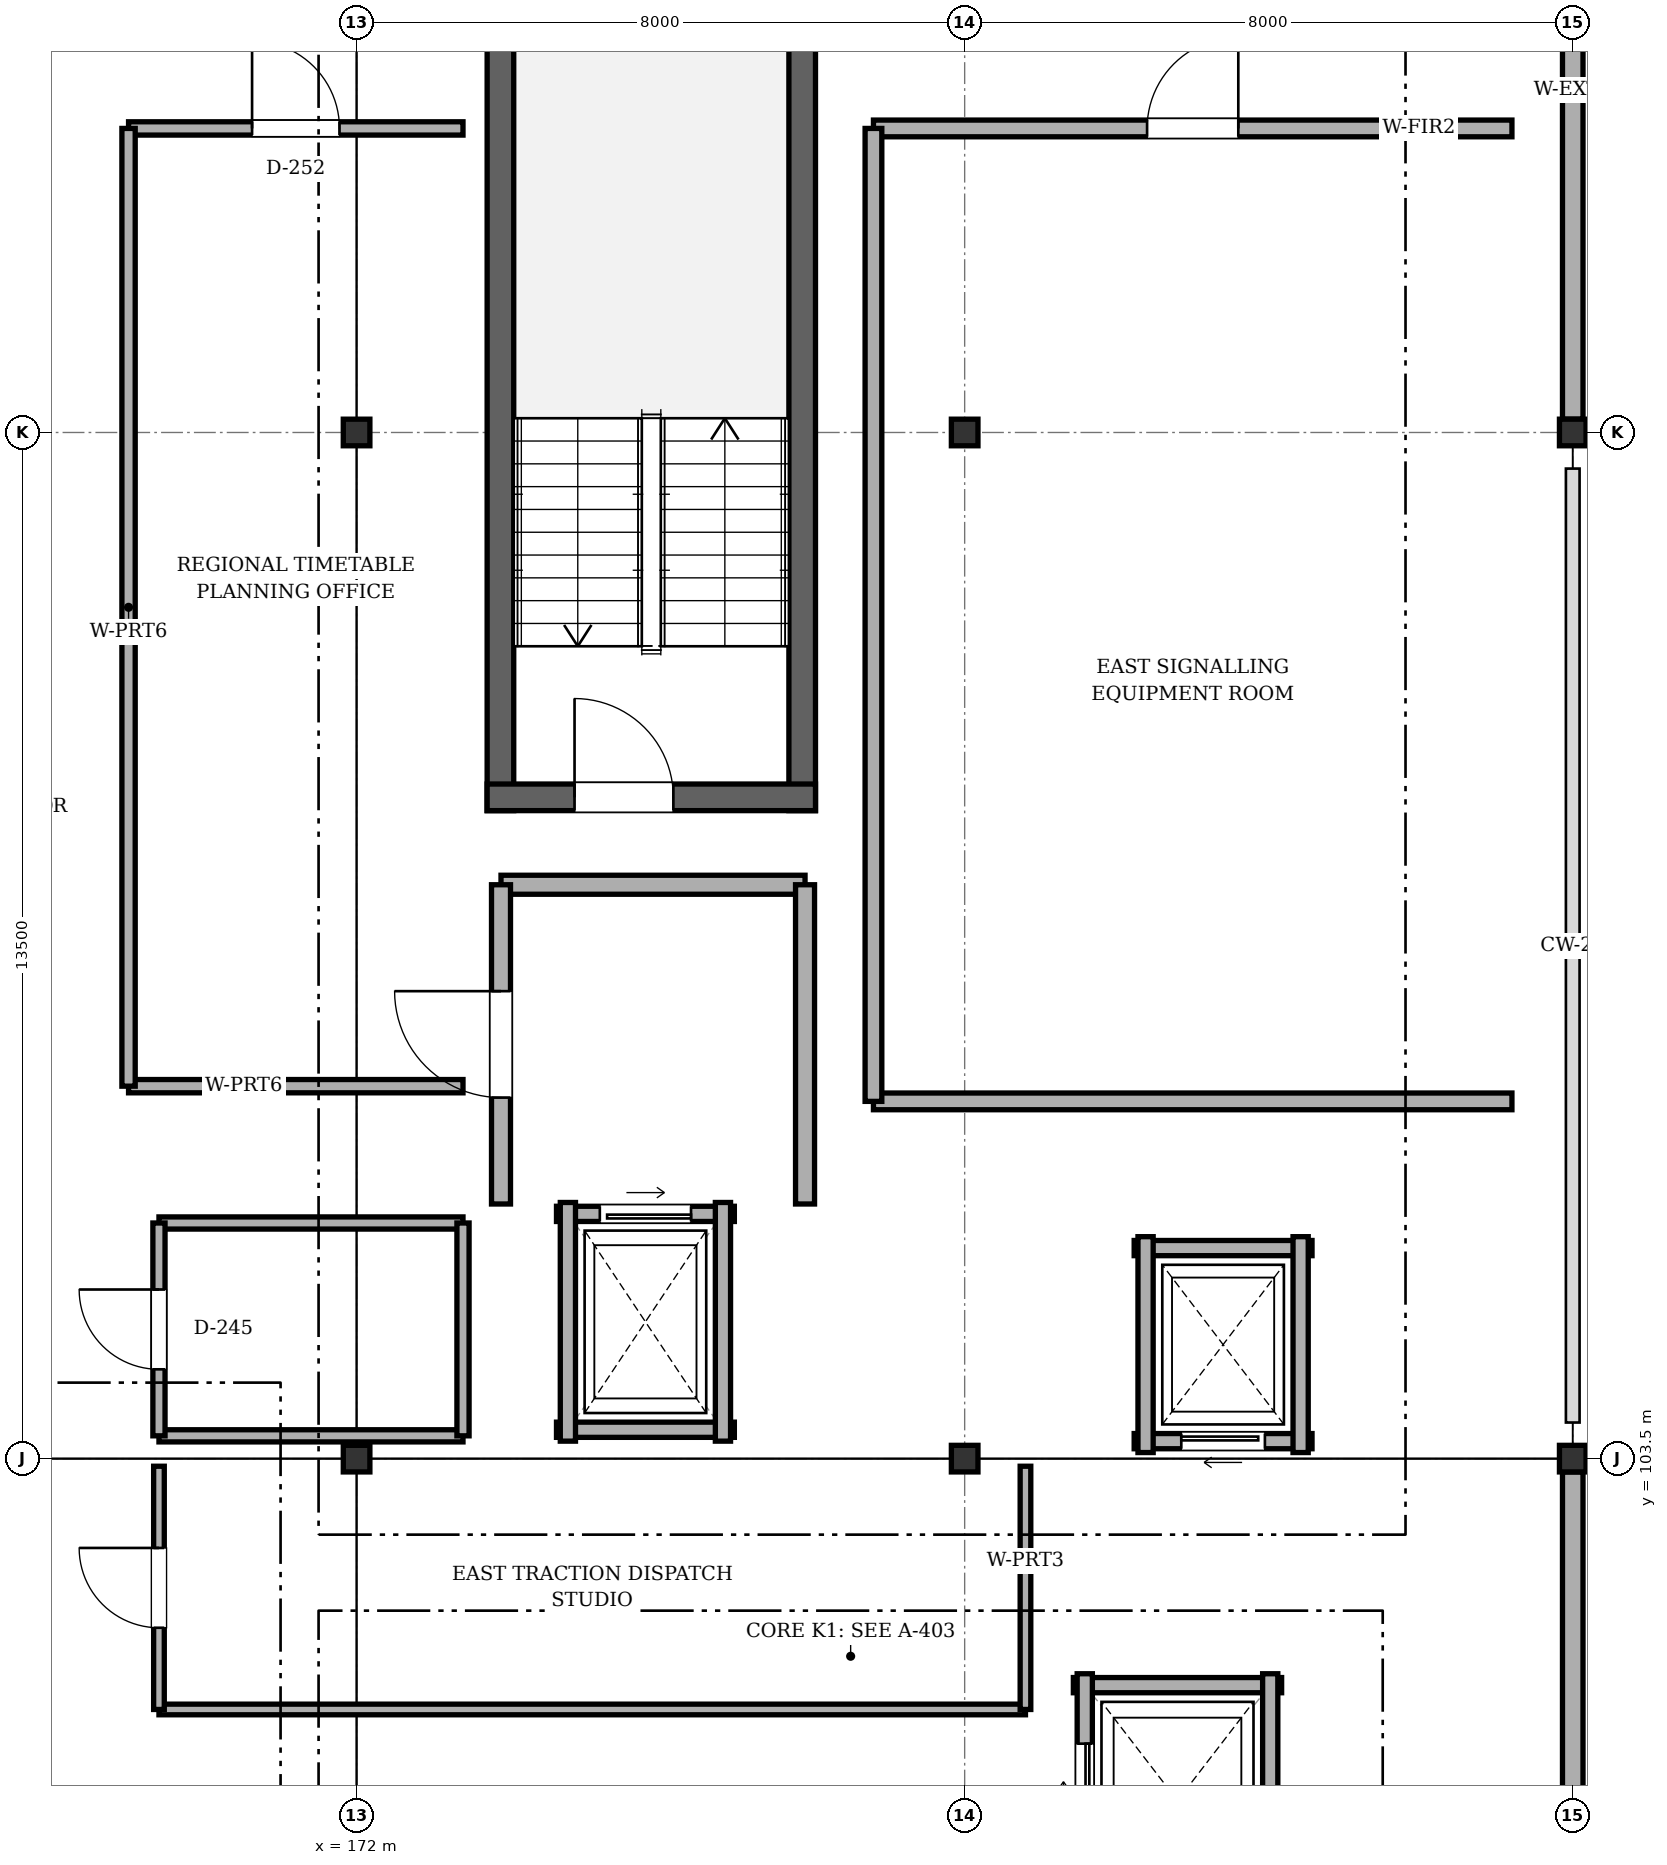
"""IFC4 building model, lengths in metres.
Left out: names, types, materials, properties, quantities, classifications, styles, units other than length and angle.
Written with IfcOpenShell. Run it as: python <this file> out.ifc"""

import sys

from ifc_helpers import new_model, si_unit, direction, frame, frame_2d, origin, origin_2d, place, context, subcontext, project, spatial, rectangle, i_section, extrude, element, fill, save


model = new_model("IFC4")
c1 = context("Model", 3, precision=1e-05, world=origin(), true_north=direction((0.0, 1.0)))
c2 = subcontext(c1, "Body", "Model", "MODEL_VIEW")
j1 = project(units=[si_unit("LENGTHUNIT", "METRE"), si_unit("PLANEANGLEUNIT", "RADIAN")], contexts=[c1])
p1 = place(None, origin())
s1 = spatial("IfcSite", under=j1, at=p1, CompositionType="ELEMENT")
p2 = place(p1, origin())
s2 = spatial("IfcBuilding", under=s1, at=p2, CompositionType="ELEMENT")
p3 = place(p2, frame((0.0, 0.0, 17.6)))
s3 = spatial("IfcBuildingStorey", under=s2, at=p3, CompositionType="ELEMENT", Elevation=17.6)
for number, where, z_axis, x_axis in (
    (1, (172.0, 103.5, 0.0), (0.0, 0.0, 1.0), (1.0, 0.0, 0.0)),
    (2, (172.0, 117.0, 0.0), (0.0, 0.0, 1.0), (1.0, 0.0, 0.0)),
    (3, (180.0, 103.5, 0.0), (0.0, 0.0, 1.0), (1.0, 0.0, 0.0)),
    (4, (180.0, 117.0, 0.0), (0.0, 0.0, 1.0), (1.0, 0.0, 0.0)),
    (5, (188.0, 103.5, 0.0), (0.0, 0.0, 1.0), (1.0, 0.0, 0.0)),
    (6, (188.0, 117.0, 0.0), (0.0, 0.0, 1.0), (1.0, 0.0, 0.0)),
):
    element("IfcColumn", number, at=place(p3, frame(where, z_axis=z_axis, x_axis=x_axis)), inside=s3, PredefinedType="COLUMN", context=c2, shape_type="SweptSolid", body=[
        extrude(i_section(OverallWidth=0.35, OverallDepth=0.35, WebThickness=0.012, FlangeThickness=0.019, FilletRadius=0.02, at=origin_2d()), origin(), (0.0, 0.0, 1.0), 3.2),
    ])
for number, where, z_axis, x_axis in (
    (7, (188.0, 103.325, 0.0), (0.0, 0.0, 1.0), (0.0, -1.0, 0.0)),
    (8, (188.0, 125.825, 0.0), (0.0, 0.0, 1.0), (0.0, -1.0, 0.0)),
):
    element("IfcWall", number, at=place(p3, frame(where, z_axis=z_axis, x_axis=x_axis)), inside=s3, PredefinedType="SOLIDWALL", context=c2, shape_type="SweptSolid", body=[
        extrude(rectangle(XDim=8.65, YDim=0.27, at=frame_2d((4.325, 0.0))), origin(), (0.0, 0.0, 1.0), 2.375),
    ])
for number, where, z_axis, x_axis in (
    (9, (177.863, 112.025, 0.0), (0.0, 0.0, 1.0), (0.0, 1.0, 0.0)),
    (10, (173.893, 122.522, 0.0), (0.0, 0.0, 1.0), (0.0, -1.0, 0.0)),
):
    element("IfcWall", number, at=place(p3, frame(where, z_axis=z_axis, x_axis=x_axis)), inside=s3, PredefinedType="SHEAR", context=c2, shape_type="SweptSolid", body=[
        extrude(rectangle(XDim=10.498, YDim=0.35, at=frame_2d((5.249, 0.0))), origin(), (0.0, 0.0, 1.0), 2.98),
    ])
p4 = place(p3, frame((173.718, 112.2, 0.0), z_axis=(0.0, 0.0, 1.0), x_axis=(1.0, 0.0, 0.0)))
e11 = element("IfcWall", 11, at=p4, inside=s3, PredefinedType="SHEAR", context=c2, shape_type="SweptSolid", body=[
    extrude(rectangle(XDim=4.32, YDim=0.35, at=frame_2d((2.16, 0.0))), origin(), (0.0, 0.0, 1.0), 2.98),
])
p5 = place(p4, frame((1.15, 0.0, 0.0)))
e12 = element("IfcOpeningElement", 12, at=p5, cuts=e11, PredefinedType="OPENING", context=c2, shape_type="SweptSolid", body=[
    extrude(rectangle(XDim=1.3, YDim=2.1, at=frame_2d((0.65, 1.05))), frame((0.0, 0.185, 0.0), z_axis=(0.0, -1.0, 0.0), x_axis=(1.0, 0.0, 0.0)), (0.0, 0.0, 1.0), 0.37),
])
p6 = place(p3, frame((174.63, 103.88, 0.0), z_axis=(0.0, 0.0, 1.0), x_axis=(1.0, 0.0, 0.0)))
e13 = element("IfcWall", 13, at=p6, inside=s3, PredefinedType="SOLIDWALL", context=c2, shape_type="SweptSolid", body=[
    extrude(rectangle(XDim=2.34, YDim=0.2, at=frame_2d((1.17, 0.0))), origin(), (0.0, 0.0, 1.0), 2.515),
])
p7 = place(p3, frame((176.97, 106.72, 0.0), z_axis=(0.0, 0.0, 1.0), x_axis=(-1.0, 0.0, 0.0)))
e14 = element("IfcWall", 14, at=p7, inside=s3, PredefinedType="SOLIDWALL", context=c2, shape_type="SweptSolid", body=[
    extrude(rectangle(XDim=2.34, YDim=0.2, at=frame_2d((1.17, 0.0))), origin(), (0.0, 0.0, 1.0), 2.955),
])
p8 = place(p7, frame((0.57, 0.0, 0.0)))
e15 = element("IfcOpeningElement", 15, at=p8, cuts=e14, PredefinedType="OPENING", context=c2, shape_type="SweptSolid", body=[
    extrude(rectangle(XDim=1.2, YDim=2.15, at=frame_2d((0.6, 1.075))), frame((0.0, 0.11, 0.0), z_axis=(0.0, -1.0, 0.0), x_axis=(1.0, 0.0, 0.0)), (0.0, 0.0, 1.0), 0.22),
])
for number, where, z_axis, x_axis in (
    (16, (174.78, 106.87, 0.0), (0.0, 0.0, 1.0), (0.0, -1.0, 0.0)),
    (17, (176.82, 103.73, 0.0), (0.0, 0.0, 1.0), (0.0, 1.0, 0.0)),
):
    element("IfcWall", number, at=place(p3, frame(where, z_axis=z_axis, x_axis=x_axis)), inside=s3, PredefinedType="SOLIDWALL", context=c2, shape_type="SweptSolid", body=[
        extrude(rectangle(XDim=3.14, YDim=0.2, at=frame_2d((1.57, 0.0))), origin(), (0.0, 0.0, 1.0), 2.515),
    ])
p9 = place(p3, frame((182.23, 103.73, 0.0), z_axis=(0.0, 0.0, 1.0), x_axis=(1.0, 0.0, 0.0)))
e18 = element("IfcWall", 18, at=p9, inside=s3, PredefinedType="SOLIDWALL", context=c2, shape_type="SweptSolid", body=[
    extrude(rectangle(XDim=2.34, YDim=0.2, at=frame_2d((1.17, 0.0))), origin(), (0.0, 0.0, 1.0), 2.515),
])
p10 = place(p9, frame((0.62, 0.0, 0.0)))
e19 = element("IfcOpeningElement", 19, at=p10, cuts=e18, PredefinedType="OPENING", context=c2, shape_type="SweptSolid", body=[
    extrude(rectangle(XDim=1.1, YDim=2.15, at=frame_2d((0.55, 1.075))), frame((0.0, 0.11, 0.0), z_axis=(0.0, -1.0, 0.0), x_axis=(1.0, 0.0, 0.0)), (0.0, 0.0, 1.0), 0.22),
])
p11 = place(p3, frame((184.57, 106.27, 0.0), z_axis=(0.0, 0.0, 1.0), x_axis=(-1.0, 0.0, 0.0)))
e20 = element("IfcWall", 20, at=p11, inside=s3, PredefinedType="SOLIDWALL", context=c2, shape_type="SweptSolid", body=[
    extrude(rectangle(XDim=2.34, YDim=0.2, at=frame_2d((1.17, 0.0))), origin(), (0.0, 0.0, 1.0), 2.955),
])
for number, where, z_axis, x_axis in (
    (21, (182.38, 106.42, 0.0), (0.0, 0.0, 1.0), (0.0, -1.0, 0.0)),
    (22, (184.42, 103.58, 0.0), (0.0, 0.0, 1.0), (0.0, 1.0, 0.0)),
):
    element("IfcWall", number, at=place(p3, frame(where, z_axis=z_axis, x_axis=x_axis)), inside=s3, PredefinedType="SOLIDWALL", context=c2, shape_type="SweptSolid", body=[
        extrude(rectangle(XDim=2.84, YDim=0.2, at=frame_2d((1.42, 0.0))), origin(), (0.0, 0.0, 1.0), 2.515),
    ])
p12 = place(p3, frame((184.17, 100.52, 0.0), z_axis=(0.0, 0.0, 1.0), x_axis=(-1.0, 0.0, 0.0)))
e23 = element("IfcWall", 23, at=p12, inside=s3, PredefinedType="SOLIDWALL", context=c2, shape_type="SweptSolid", body=[
    extrude(rectangle(XDim=2.74, YDim=0.2, at=frame_2d((1.37, 0.0))), origin(), (0.0, 0.0, 1.0), 2.955),
])
p13 = place(p3, frame((181.58, 100.67, 0.0), z_axis=(0.0, 0.0, 1.0), x_axis=(0.0, -1.0, 0.0)))
e24 = element("IfcWall", 24, at=p13, inside=s3, PredefinedType="SOLIDWALL", context=c2, shape_type="SweptSolid", body=[
    extrude(rectangle(XDim=3.34, YDim=0.2, at=frame_2d((1.67, 0.0))), origin(), (0.0, 0.0, 1.0), 2.955),
])
p14 = place(p13, frame((0.92, 0.0, 0.0)))
e25 = element("IfcOpeningElement", 25, at=p14, cuts=e24, PredefinedType="OPENING", context=c2, shape_type="SweptSolid", body=[
    extrude(rectangle(XDim=1.5, YDim=2.2, at=frame_2d((0.75, 1.1))), frame((0.0, 0.11, 0.0), z_axis=(0.0, -1.0, 0.0), x_axis=(1.0, 0.0, 0.0)), (0.0, 0.0, 1.0), 0.22),
])
p15 = place(p3, frame((184.02, 97.33, 0.0), z_axis=(0.0, 0.0, 1.0), x_axis=(0.0, 1.0, 0.0)))
e26 = element("IfcWall", 26, at=p15, inside=s3, PredefinedType="SOLIDWALL", context=c2, shape_type="SweptSolid", body=[
    extrude(rectangle(XDim=3.34, YDim=0.2, at=frame_2d((1.67, 0.0))), origin(), (0.0, 0.0, 1.0), 2.955),
])
p16 = place(p3, frame((180.8, 100.2, 0.0), z_axis=(0.0, 0.0, 1.0), x_axis=(-1.0, 0.0, 0.0)))
e27 = element("IfcWall", 27, at=p16, inside=s3, PredefinedType="PARTITIONING", context=c2, shape_type="SweptSolid", body=[
    extrude(rectangle(XDim=11.4, YDim=0.14, at=frame_2d((5.7, 0.0))), origin(), (0.0, 0.0, 1.0), 2.565),
])
p17 = place(p3, frame((169.4, 100.2, 0.0), z_axis=(0.0, 0.0, 1.0), x_axis=(0.0, 1.0, 0.0)))
e28 = element("IfcWall", 28, at=p17, inside=s3, PredefinedType="PARTITIONING", context=c2, shape_type="SweptSolid", body=[
    extrude(rectangle(XDim=3.2, YDim=0.14, at=frame_2d((1.6, 0.0))), origin(), (0.0, 0.0, 1.0), 2.515),
])
p18 = place(p17, frame((1.075, 0.0, 0.0)))
e29 = element("IfcOpeningElement", 29, at=p18, cuts=e28, PredefinedType="OPENING", context=c2, shape_type="SweptSolid", body=[
    extrude(rectangle(XDim=1.05, YDim=2.1, at=frame_2d((0.525, 1.05))), frame((0.0, 0.08, 0.0), z_axis=(0.0, -1.0, 0.0), x_axis=(1.0, 0.0, 0.0)), (0.0, 0.0, 1.0), 0.16),
])
p19 = place(p3, frame((180.8, 103.4, 0.0), z_axis=(0.0, 0.0, 1.0), x_axis=(0.0, -1.0, 0.0)))
e30 = element("IfcWall", 30, at=p19, inside=s3, PredefinedType="PARTITIONING", context=c2, shape_type="SweptSolid", body=[
    extrude(rectangle(XDim=3.2, YDim=0.14, at=frame_2d((1.6, 0.0))), origin(), (0.0, 0.0, 1.0), 2.355),
])
for number, where, z_axis, x_axis in (
    (31, (173.4, 103.8, 0.0), (0.0, 0.0, 1.0), (-1.0, 0.0, 0.0)),
    (32, (169.4, 106.6, 0.0), (0.0, 0.0, 1.0), (1.0, 0.0, 0.0)),
):
    element("IfcWall", number, at=place(p3, frame(where, z_axis=z_axis, x_axis=x_axis)), inside=s3, PredefinedType="PARTITIONING", context=c2, shape_type="SweptSolid", body=[
        extrude(rectangle(XDim=4.0, YDim=0.16, at=frame_2d((2.0, 0.0))), origin(), (0.0, 0.0, 1.0), 2.355),
    ])
p20 = place(p3, frame((169.4, 103.8, 0.0), z_axis=(0.0, 0.0, 1.0), x_axis=(0.0, 1.0, 0.0)))
e33 = element("IfcWall", 33, at=p20, inside=s3, PredefinedType="PARTITIONING", context=c2, shape_type="SweptSolid", body=[
    extrude(rectangle(XDim=2.8, YDim=0.16, at=frame_2d((1.4, 0.0))), origin(), (0.0, 0.0, 1.0), 2.515),
])
p21 = place(p20, frame((0.875, 0.0, 0.0)))
e34 = element("IfcOpeningElement", 34, at=p21, cuts=e33, PredefinedType="OPENING", context=c2, shape_type="SweptSolid", body=[
    extrude(rectangle(XDim=1.05, YDim=2.1, at=frame_2d((0.525, 1.05))), frame((0.0, 0.09, 0.0), z_axis=(0.0, -1.0, 0.0), x_axis=(1.0, 0.0, 0.0)), (0.0, 0.0, 1.0), 0.18),
])
p22 = place(p3, frame((173.4, 106.6, 0.0), z_axis=(0.0, 0.0, 1.0), x_axis=(0.0, -1.0, 0.0)))
e35 = element("IfcWall", 35, at=p22, inside=s3, PredefinedType="PARTITIONING", context=c2, shape_type="SweptSolid", body=[
    extrude(rectangle(XDim=2.8, YDim=0.16, at=frame_2d((1.4, 0.0))), origin(), (0.0, 0.0, 1.0), 2.515),
])
p23 = place(p3, frame((187.2, 108.2, 0.0), z_axis=(0.0, 0.0, 1.0), x_axis=(-1.0, 0.0, 0.0)))
e36 = element("IfcWall", 36, at=p23, inside=s3, PredefinedType="SOLIDWALL", context=c2, shape_type="SweptSolid", body=[
    extrude(rectangle(XDim=8.4, YDim=0.22, at=frame_2d((4.2, 0.0))), origin(), (0.0, 0.0, 1.0), 2.355),
])
p24 = place(p3, frame((178.8, 121.0, 0.0), z_axis=(0.0, 0.0, 1.0), x_axis=(1.0, 0.0, 0.0)))
e37 = element("IfcWall", 37, at=p24, inside=s3, PredefinedType="SOLIDWALL", context=c2, shape_type="SweptSolid", body=[
    extrude(rectangle(XDim=8.4, YDim=0.22, at=frame_2d((4.2, 0.0))), origin(), (0.0, 0.0, 1.0), 2.495),
])
p25 = place(p24, frame((3.6, 0.0, 0.0)))
e38 = element("IfcOpeningElement", 38, at=p25, cuts=e37, PredefinedType="OPENING", context=c2, shape_type="SweptSolid", body=[
    extrude(rectangle(XDim=1.2, YDim=2.1, at=frame_2d((0.6, 1.05))), frame((0.0, 0.12, 0.0), z_axis=(0.0, -1.0, 0.0), x_axis=(1.0, 0.0, 0.0)), (0.0, 0.0, 1.0), 0.24),
])
p26 = place(p3, frame((178.8, 108.2, 0.0), z_axis=(0.0, 0.0, 1.0), x_axis=(0.0, 1.0, 0.0)))
e39 = element("IfcWall", 39, at=p26, inside=s3, PredefinedType="SOLIDWALL", context=c2, shape_type="SweptSolid", body=[
    extrude(rectangle(XDim=12.8, YDim=0.22, at=frame_2d((6.4, 0.0))), origin(), (0.0, 0.0, 1.0), 2.955),
])
p27 = place(p3, frame((173.4, 108.4, 0.0), z_axis=(0.0, 0.0, 1.0), x_axis=(-1.0, 0.0, 0.0)))
e40 = element("IfcWall", 40, at=p27, inside=s3, PredefinedType="PARTITIONING", context=c2, shape_type="SweptSolid", body=[
    extrude(rectangle(XDim=4.4, YDim=0.175, at=frame_2d((2.2, 0.0))), origin(), (0.0, 0.0, 1.0), 2.355),
])
p28 = place(p3, frame((169.0, 121.0, 0.0), z_axis=(0.0, 0.0, 1.0), x_axis=(1.0, 0.0, 0.0)))
e41 = element("IfcWall", 41, at=p28, inside=s3, PredefinedType="PARTITIONING", context=c2, shape_type="SweptSolid", body=[
    extrude(rectangle(XDim=4.4, YDim=0.175, at=frame_2d((2.2, 0.0))), origin(), (0.0, 0.0, 1.0), 2.565),
])
p29 = place(p28, frame((1.625, 0.0, 0.0)))
e42 = element("IfcOpeningElement", 42, at=p29, cuts=e41, PredefinedType="OPENING", context=c2, shape_type="SweptSolid", body=[
    extrude(rectangle(XDim=1.15, YDim=2.1, at=frame_2d((0.575, 1.05))), frame((0.0, 0.097, 0.0), z_axis=(0.0, -1.0, 0.0), x_axis=(1.0, 0.0, 0.0)), (0.0, 0.0, 1.0), 0.195),
])
p30 = place(p3, frame((169.0, 108.4, 0.0), z_axis=(0.0, 0.0, 1.0), x_axis=(0.0, 1.0, 0.0)))
e43 = element("IfcWall", 43, at=p30, inside=s3, PredefinedType="PARTITIONING", context=c2, shape_type="SweptSolid", body=[
    extrude(rectangle(XDim=12.6, YDim=0.175, at=frame_2d((6.3, 0.0))), origin(), (0.0, 0.0, 1.0), 2.515),
])
p31 = place(p3, frame((173.9, 111.05, 0.0), z_axis=(0.0, 0.0, 1.0), x_axis=(1.0, 0.0, 0.0)))
e44 = element("IfcWall", 44, at=p31, inside=s3, PredefinedType="SOLIDWALL", context=c2, shape_type="SweptSolid", body=[
    extrude(rectangle(XDim=4.0, YDim=0.25, at=frame_2d((2.0, 0.0))), origin(), (0.0, 0.0, 1.0), 2.955),
])
p32 = place(p3, frame((173.9, 106.85, 0.0), z_axis=(0.0, 0.0, 1.0), x_axis=(0.0, 1.0, 0.0)))
e45 = element("IfcWall", 45, at=p32, inside=s3, PredefinedType="SOLIDWALL", context=c2, shape_type="SweptSolid", body=[
    extrude(rectangle(XDim=4.2, YDim=0.25, at=frame_2d((2.1, 0.0))), origin(), (0.0, 0.0, 1.0), 2.955),
])
p33 = place(p32, frame((1.4, 0.0, 0.0)))
e46 = element("IfcOpeningElement", 46, at=p33, cuts=e45, PredefinedType="OPENING", context=c2, shape_type="SweptSolid", body=[
    extrude(rectangle(XDim=1.4, YDim=2.1, at=frame_2d((0.7, 1.05))), frame((0.0, 0.135, 0.0), z_axis=(0.0, -1.0, 0.0), x_axis=(1.0, 0.0, 0.0)), (0.0, 0.0, 1.0), 0.27),
])
p34 = place(p3, frame((177.9, 111.05, 0.0), z_axis=(0.0, 0.0, 1.0), x_axis=(0.0, -1.0, 0.0)))
e47 = element("IfcWall", 47, at=p34, inside=s3, PredefinedType="SOLIDWALL", context=c2, shape_type="SweptSolid", body=[
    extrude(rectangle(XDim=4.2, YDim=0.25, at=frame_2d((2.1, 0.0))), origin(), (0.0, 0.0, 1.0), 2.955),
])
p35 = place(p5, origin())
e48 = element("IfcDoor", 48, at=p35, inside=s3, OperationType="SINGLE_SWING_LEFT", PredefinedType="DOOR", context=c2, shape_type="SweptSolid", body=[
    extrude(rectangle(XDim=1.3, YDim=2.1, at=frame_2d((0.65, 1.05))), frame((0.0, 0.025, 0.0), z_axis=(0.0, -1.0, 0.0), x_axis=(1.0, 0.0, 0.0)), (0.0, 0.0, 1.0), 0.05),
])
fill(e12, e48)
p36 = place(p8, origin())
e49 = element("IfcDoor", 49, at=p36, inside=s3, OperationType="SLIDING_TO_LEFT", PredefinedType="DOOR", context=c2, shape_type="SweptSolid", body=[
    extrude(rectangle(XDim=1.2, YDim=2.15, at=frame_2d((0.6, 1.075))), frame((0.0, 0.025, 0.0), z_axis=(0.0, -1.0, 0.0), x_axis=(1.0, 0.0, 0.0)), (0.0, 0.0, 1.0), 0.05),
])
fill(e15, e49)
p37 = place(p10, origin())
e50 = element("IfcDoor", 50, at=p37, inside=s3, OperationType="SLIDING_TO_LEFT", PredefinedType="DOOR", context=c2, shape_type="SweptSolid", body=[
    extrude(rectangle(XDim=1.1, YDim=2.15, at=frame_2d((0.55, 1.075))), frame((0.0, 0.025, 0.0), z_axis=(0.0, -1.0, 0.0), x_axis=(1.0, 0.0, 0.0)), (0.0, 0.0, 1.0), 0.05),
])
fill(e19, e50)
p38 = place(p14, origin())
e51 = element("IfcDoor", 51, at=p38, inside=s3, OperationType="SLIDING_TO_LEFT", PredefinedType="DOOR", context=c2, shape_type="SweptSolid", body=[
    extrude(rectangle(XDim=1.5, YDim=2.2, at=frame_2d((0.75, 1.1))), frame((0.0, 0.025, 0.0), z_axis=(0.0, -1.0, 0.0), x_axis=(1.0, 0.0, 0.0)), (0.0, 0.0, 1.0), 0.05),
])
fill(e25, e51)
p39 = place(p18, origin())
e52 = element("IfcDoor", 52, at=p39, inside=s3, OperationType="SINGLE_SWING_RIGHT", PredefinedType="DOOR", context=c2, shape_type="SweptSolid", body=[
    extrude(rectangle(XDim=1.05, YDim=2.1, at=frame_2d((0.525, 1.05))), frame((0.0, 0.025, 0.0), z_axis=(0.0, -1.0, 0.0), x_axis=(1.0, 0.0, 0.0)), (0.0, 0.0, 1.0), 0.05),
])
fill(e29, e52)
p40 = place(p21, origin())
e53 = element("IfcDoor", 53, at=p40, inside=s3, OperationType="SINGLE_SWING_RIGHT", PredefinedType="DOOR", context=c2, shape_type="SweptSolid", body=[
    extrude(rectangle(XDim=1.05, YDim=2.1, at=frame_2d((0.525, 1.05))), frame((0.0, 0.025, 0.0), z_axis=(0.0, -1.0, 0.0), x_axis=(1.0, 0.0, 0.0)), (0.0, 0.0, 1.0), 0.05),
])
fill(e34, e53)
p41 = place(p25, origin())
e54 = element("IfcDoor", 54, at=p41, inside=s3, OperationType="SINGLE_SWING_RIGHT", PredefinedType="DOOR", context=c2, shape_type="SweptSolid", body=[
    extrude(rectangle(XDim=1.2, YDim=2.1, at=frame_2d((0.6, 1.05))), frame((0.0, 0.025, 0.0), z_axis=(0.0, -1.0, 0.0), x_axis=(1.0, 0.0, 0.0)), (0.0, 0.0, 1.0), 0.05),
])
fill(e38, e54)
p42 = place(p29, origin())
e55 = element("IfcDoor", 55, at=p42, inside=s3, OperationType="SINGLE_SWING_LEFT", PredefinedType="DOOR", context=c2, shape_type="SweptSolid", body=[
    extrude(rectangle(XDim=1.15, YDim=2.1, at=frame_2d((0.575, 1.05))), frame((0.0, 0.025, 0.0), z_axis=(0.0, -1.0, 0.0), x_axis=(1.0, 0.0, 0.0)), (0.0, 0.0, 1.0), 0.05),
])
fill(e42, e55)
p43 = place(p33, origin())
e56 = element("IfcDoor", 56, at=p43, inside=s3, OperationType="SINGLE_SWING_RIGHT", PredefinedType="DOOR", context=c2, shape_type="SweptSolid", body=[
    extrude(rectangle(XDim=1.4, YDim=2.1, at=frame_2d((0.7, 1.05))), frame((0.0, 0.025, 0.0), z_axis=(0.0, -1.0, 0.0), x_axis=(1.0, 0.0, 0.0)), (0.0, 0.0, 1.0), 0.05),
])
fill(e46, e56)
save(model, sys.argv[1])
